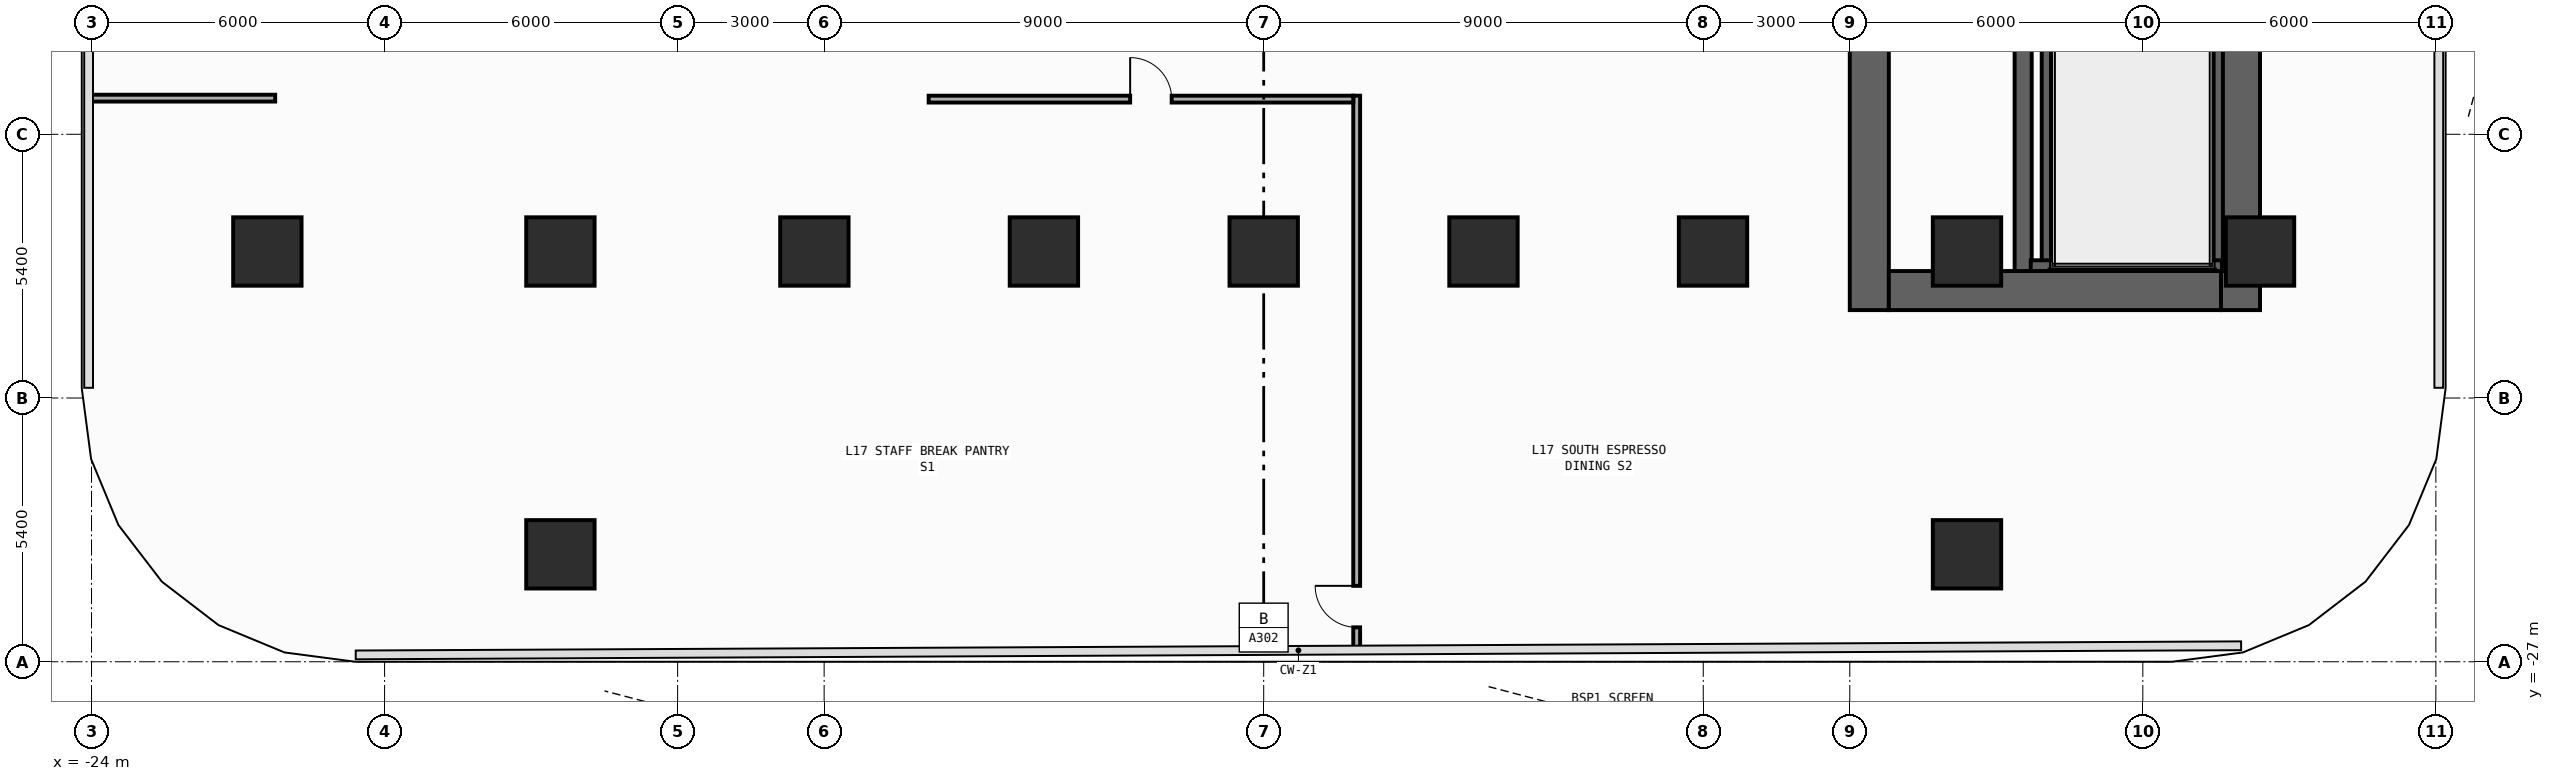
"""IFC4 building model, lengths in metres.
Left out: names, types, materials, properties, quantities, classifications, styles, units other than length and angle.
Written with IfcOpenShell. Run it as: python <this file> out.ifc"""

import sys

from ifc_helpers import new_model, si_unit, direction, frame, frame_2d, origin, origin_2d, place, context, subcontext, project, spatial, rectangle, extrude, element, fill, save


model = new_model("IFC4")
c1 = context("Model", 3, precision=1e-05, world=origin(), true_north=direction((0.0, 1.0)))
c2 = subcontext(c1, "Body", "Model", "MODEL_VIEW")
j1 = project(units=[si_unit("LENGTHUNIT", "METRE"), si_unit("PLANEANGLEUNIT", "RADIAN")], contexts=[c1])
p1 = place(None, origin())
s1 = spatial("IfcSite", under=j1, at=p1, CompositionType="ELEMENT")
p2 = place(p1, origin())
s2 = spatial("IfcBuilding", under=s1, at=p2, CompositionType="ELEMENT")
p3 = place(p2, frame((0.0, 0.0, 72.2)))
s3 = spatial("IfcBuildingStorey", under=s2, at=p3, CompositionType="ELEMENT", Elevation=72.2)
p4 = place(p3, frame((12.4, -19.8, 0.0), z_axis=(0.0, 0.0, 1.0), x_axis=(0.0, 1.0, 0.0)))
e1 = element("IfcWall", 1, at=p4, inside=s3, PredefinedType="SHEAR", context=c2, shape_type="SweptSolid", body=[
    extrude(rectangle(XDim=27.0, YDim=0.8, at=frame_2d((13.5, 0.0))), origin(), (0.0, 0.0, 1.0), 3.94),
])
p5 = place(p4, frame((23.05, 0.0, 0.0)))
e2 = element("IfcOpeningElement", 2, at=p5, cuts=e1, PredefinedType="OPENING", context=c2, shape_type="SweptSolid", body=[
    extrude(rectangle(XDim=1.1, YDim=2.2, at=frame_2d((0.55, 1.1))), frame((0.0, 0.41, 0.0), z_axis=(0.0, -1.0, 0.0), x_axis=(1.0, 0.0, 0.0)), (0.0, 0.0, 1.0), 0.82),
])
p6 = place(p4, frame((19.85, 0.0, 0.0)))
e3 = element("IfcOpeningElement", 3, at=p6, cuts=e1, PredefinedType="OPENING", context=c2, shape_type="SweptSolid", body=[
    extrude(rectangle(XDim=1.1, YDim=2.2, at=frame_2d((0.55, 1.1))), frame((0.0, 0.41, 0.0), z_axis=(0.0, -1.0, 0.0), x_axis=(1.0, 0.0, 0.0)), (0.0, 0.0, 1.0), 0.82),
])
p7 = place(p4, frame((16.65, 0.0, 0.0)))
e4 = element("IfcOpeningElement", 4, at=p7, cuts=e1, PredefinedType="OPENING", context=c2, shape_type="SweptSolid", body=[
    extrude(rectangle(XDim=1.1, YDim=2.2, at=frame_2d((0.55, 1.1))), frame((0.0, 0.41, 0.0), z_axis=(0.0, -1.0, 0.0), x_axis=(1.0, 0.0, 0.0)), (0.0, 0.0, 1.0), 0.82),
])
p8 = place(p4, frame((10.175, 0.0, 0.0)))
e5 = element("IfcOpeningElement", 5, at=p8, cuts=e1, PredefinedType="OPENING", context=c2, shape_type="SweptSolid", body=[
    extrude(rectangle(XDim=0.85, YDim=2.1, at=frame_2d((0.425, 1.05))), frame((0.0, 0.41, 0.0), z_axis=(0.0, -1.0, 0.0), x_axis=(1.0, 0.0, 0.0)), (0.0, 0.0, 1.0), 0.82),
])
p9 = place(p4, frame((12.725, 0.0, 0.0)))
e6 = element("IfcOpeningElement", 6, at=p9, cuts=e1, PredefinedType="OPENING", context=c2, shape_type="SweptSolid", body=[
    extrude(rectangle(XDim=1.15, YDim=2.2, at=frame_2d((0.575, 1.1))), frame((0.0, 0.41, 0.0), z_axis=(0.0, -1.0, 0.0), x_axis=(1.0, 0.0, 0.0)), (0.0, 0.0, 1.0), 0.82),
])
p10 = place(p4, frame((25.125, 0.0, 0.0)))
e7 = element("IfcOpeningElement", 7, at=p10, cuts=e1, PredefinedType="OPENING", context=c2, shape_type="SweptSolid", body=[
    extrude(rectangle(XDim=0.85, YDim=2.1, at=frame_2d((0.425, 1.05))), frame((0.0, 0.41, 0.0), z_axis=(0.0, -1.0, 0.0), x_axis=(1.0, 0.0, 0.0)), (0.0, 0.0, 1.0), 0.82),
])
p11 = place(p3, frame((20.0, -19.8, 0.0), z_axis=(0.0, 0.0, 1.0), x_axis=(0.0, 1.0, 0.0)))
e8 = element("IfcWall", 8, at=p11, inside=s3, PredefinedType="SHEAR", context=c2, shape_type="SweptSolid", body=[
    extrude(rectangle(XDim=27.0, YDim=0.8, at=frame_2d((13.5, 0.0))), origin(), (0.0, 0.0, 1.0), 3.94),
])
p12 = place(p3, frame((12.8, -19.4, 0.0), z_axis=(0.0, 0.0, 1.0), x_axis=(1.0, 0.0, 0.0)))
e9 = element("IfcWall", 9, at=p12, inside=s3, PredefinedType="SHEAR", context=c2, shape_type="SweptSolid", body=[
    extrude(rectangle(XDim=6.8, YDim=0.8, at=frame_2d((3.4, 0.0))), origin(), (0.0, 0.0, 1.0), 3.94),
])
p13 = place(p3, frame((15.55, -19.0, 0.0), z_axis=(0.0, 0.0, 1.0), x_axis=(0.0, 1.0, 0.0)))
e10 = element("IfcWall", 10, at=p13, inside=s3, PredefinedType="SHEAR", context=c2, shape_type="SweptSolid", body=[
    extrude(rectangle(XDim=25.4, YDim=0.35, at=frame_2d((12.7, 0.0))), origin(), (0.0, 0.0, 1.0), 3.94),
])
p14 = place(p13, frame((11.925, 0.0, 0.0)))
e11 = element("IfcOpeningElement", 11, at=p14, cuts=e10, PredefinedType="OPENING", context=c2, shape_type="SweptSolid", body=[
    extrude(rectangle(XDim=1.15, YDim=2.2, at=frame_2d((0.575, 1.1))), frame((0.0, 0.185, 0.0), z_axis=(0.0, -1.0, 0.0), x_axis=(1.0, 0.0, 0.0)), (0.0, 0.0, 1.0), 0.37),
])
p15 = place(p13, frame((24.325, 0.0, 0.0)))
e12 = element("IfcOpeningElement", 12, at=p15, cuts=e10, PredefinedType="OPENING", context=c2, shape_type="SweptSolid", body=[
    extrude(rectangle(XDim=0.85, YDim=2.1, at=frame_2d((0.425, 1.05))), frame((0.0, 0.185, 0.0), z_axis=(0.0, -1.0, 0.0), x_axis=(1.0, 0.0, 0.0)), (0.0, 0.0, 1.0), 0.37),
])
for number, where, z_axis, x_axis in (
    (13, (16.04, -18.89, 0.0), (0.0, 0.0, 1.0), (0.0, 1.0, 0.0)),
    (14, (19.53, -18.89, 0.0), (0.0, 0.0, 1.0), (0.0, 1.0, 0.0)),
):
    element("IfcWall", number, at=place(p3, frame(where, z_axis=z_axis, x_axis=x_axis)), inside=s3, PredefinedType="SHEAR", context=c2, shape_type="SweptSolid", body=[
        extrude(rectangle(XDim=11.3, YDim=0.22, at=frame_2d((5.65, 0.0))), origin(), (0.0, 0.0, 1.0), 3.94),
    ])
p16 = place(p3, frame((15.705, -18.89, 0.0), z_axis=(0.0, 0.0, 1.0), x_axis=(1.0, 0.0, 0.0)))
e15 = element("IfcWall", 15, at=p16, inside=s3, PredefinedType="SHEAR", context=c2, shape_type="SweptSolid", body=[
    extrude(rectangle(XDim=3.915, YDim=0.22, at=frame_2d((1.958, 0.0))), origin(), (0.0, 0.0, 1.0), 3.94),
])
for number, where, z_axis, x_axis in (
    (16, (-9.2, -18.6, 0.0), (0.0, 0.0, 1.0), (1.0, 0.0, 0.0)),
    (17, (9.2, -18.6, 0.0), (0.0, 0.0, 1.0), (1.0, 0.0, 0.0)),
    (18, (-20.4, -18.6, 0.0), (0.0, 0.0, 1.0), (1.0, 0.0, 0.0)),
    (19, (20.4, -18.6, 0.0), (0.0, 0.0, 1.0), (1.0, 0.0, 0.0)),
    (20, (-14.4, -18.6, 0.0), (0.0, 0.0, 1.0), (1.0, 0.0, 0.0)),
    (21, (14.4, -18.6, 0.0), (0.0, 0.0, 1.0), (1.0, 0.0, 0.0)),
    (22, (-4.5, -18.6, 0.0), (0.0, 0.0, 1.0), (1.0, 0.0, 0.0)),
    (23, (0.0, -18.6, 0.0), (0.0, 0.0, 1.0), (1.0, 0.0, 0.0)),
    (24, (4.5, -18.6, 0.0), (0.0, 0.0, 1.0), (1.0, 0.0, 0.0)),
    (25, (-14.4, -24.8, 0.0), (0.0, 0.0, 1.0), (1.0, 0.0, 0.0)),
    (26, (14.4, -24.8, 0.0), (0.0, 0.0, 1.0), (1.0, 0.0, 0.0)),
):
    element("IfcColumn", number, at=place(p3, frame(where, z_axis=z_axis, x_axis=x_axis)), inside=s3, PredefinedType="COLUMN", context=c2, shape_type="SweptSolid", body=[
        extrude(rectangle(XDim=1.4, YDim=1.4, at=origin_2d()), origin(), (0.0, 0.0, 1.0), 4.2),
    ])
p17 = place(p3, frame((-24.055, -15.46, 0.0), z_axis=(0.0, 0.0, 1.0), x_axis=(1.0, 0.0, 0.0)))
e27 = element("IfcWall", 27, at=p17, inside=s3, PredefinedType="PARTITIONING", context=c2, shape_type="SweptSolid", body=[
    extrude(rectangle(XDim=3.815, YDim=0.14, at=frame_2d((1.907, 0.0))), origin(), (0.0, 0.0, 1.0), 3.94),
])
p18 = place(p3, frame((1.904, -26.756, 0.0), z_axis=(0.0, 0.0, 1.0), x_axis=(0.0, 1.0, 0.0)))
e28 = element("IfcWall", 28, at=p18, inside=s3, PredefinedType="PARTITIONING", context=c2, shape_type="SweptSolid", body=[
    extrude(rectangle(XDim=11.346, YDim=0.14, at=frame_2d((5.673, 0.0))), origin(), (0.0, 0.0, 1.0), 3.94),
])
p19 = place(p18, frame((0.46, 0.0, 0.0)))
e29 = element("IfcOpeningElement", 29, at=p19, cuts=e28, PredefinedType="OPENING", context=c2, shape_type="SweptSolid", body=[
    extrude(rectangle(XDim=0.85, YDim=2.1, at=frame_2d((0.425, 1.05))), frame((0.0, 0.08, 0.0), z_axis=(0.0, -1.0, 0.0), x_axis=(1.0, 0.0, 0.0)), (0.0, 0.0, 1.0), 0.16),
])
p20 = place(p3, frame((-6.86, -15.48, 0.0), z_axis=(0.0, 0.0, 1.0), x_axis=(1.0, 0.0, 0.0)))
e30 = element("IfcWall", 30, at=p20, inside=s3, PredefinedType="PARTITIONING", context=c2, shape_type="SweptSolid", body=[
    extrude(rectangle(XDim=8.694, YDim=0.14, at=frame_2d((4.347, 0.0))), origin(), (0.0, 0.0, 1.0), 3.94),
])
p21 = place(p20, frame((4.125, 0.0, 0.0)))
e31 = element("IfcOpeningElement", 31, at=p21, cuts=e30, PredefinedType="OPENING", context=c2, shape_type="SweptSolid", body=[
    extrude(rectangle(XDim=0.85, YDim=2.1, at=frame_2d((0.425, 1.05))), frame((0.0, 0.08, 0.0), z_axis=(0.0, -1.0, 0.0), x_axis=(1.0, 0.0, 0.0)), (0.0, 0.0, 1.0), 0.16),
])
p22 = place(p21, origin())
e32 = element("IfcDoor", 32, at=p22, inside=s3, OperationType="SINGLE_SWING_LEFT", PredefinedType="DOOR", context=c2, shape_type="SweptSolid", body=[
    extrude(rectangle(XDim=0.85, YDim=2.1, at=frame_2d((0.425, 1.05))), frame((0.0, 0.025, 0.0), z_axis=(0.0, -1.0, 0.0), x_axis=(1.0, 0.0, 0.0)), (0.0, 0.0, 1.0), 0.05),
])
fill(e31, e32)
p23 = place(p19, origin())
e33 = element("IfcDoor", 33, at=p23, inside=s3, OperationType="SINGLE_SWING_RIGHT", PredefinedType="DOOR", context=c2, shape_type="SweptSolid", body=[
    extrude(rectangle(XDim=0.85, YDim=2.1, at=frame_2d((0.425, 1.05))), frame((0.0, 0.025, 0.0), z_axis=(0.0, -1.0, 0.0), x_axis=(1.0, 0.0, 0.0)), (0.0, 0.0, 1.0), 0.05),
])
fill(e29, e33)
save(model, sys.argv[1])
